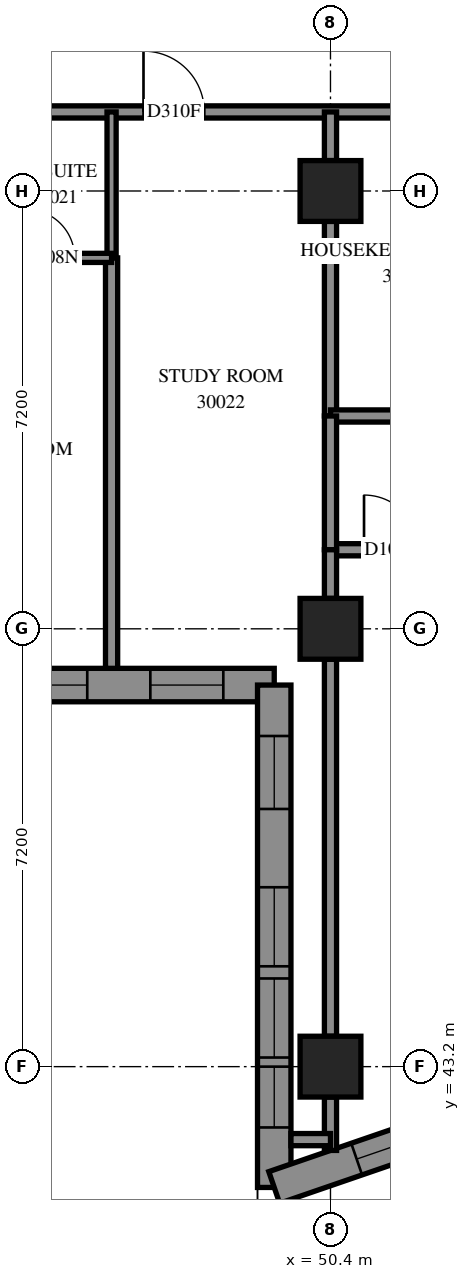
"""IFC4 building model, lengths in metres.
Left out: names, types, materials, properties, quantities, classifications, styles, units other than length and angle.
Written with IfcOpenShell. Run it as: python <this file> out.ifc"""

import sys

from ifc_helpers import new_model, si_unit, direction, frame, frame_2d, origin, origin_2d, place, context, subcontext, project, spatial, polyline, rectangle, outline, extrude, element, fill, save


model = new_model("IFC4")
c1 = context("Model", 3, precision=1e-05, world=origin(), true_north=direction((0.0, 1.0)))
c2 = subcontext(c1, "Body", "Model", "MODEL_VIEW")
j1 = project(units=[si_unit("LENGTHUNIT", "METRE"), si_unit("PLANEANGLEUNIT", "RADIAN")], contexts=[c1])
p1 = place(None, origin())
s1 = spatial("IfcSite", under=j1, at=p1, CompositionType="ELEMENT")
p2 = place(p1, origin())
s2 = spatial("IfcBuilding", under=s1, at=p2, CompositionType="ELEMENT")
p3 = place(p2, frame((0.0, 0.0, 111.8)))
s3 = spatial("IfcBuildingStorey", under=s2, at=p3, CompositionType="ELEMENT", Elevation=111.8)
for number, where, z_axis, x_axis in (
    (1, (50.4, 43.2, 0.0), (0.0, 0.0, 1.0), (1.0, 0.0, 0.0)),
    (2, (50.4, 50.4, 0.0), (0.0, 0.0, 1.0), (1.0, 0.0, 0.0)),
    (3, (50.4, 57.6, 0.0), (0.0, 0.0, 1.0), (1.0, 0.0, 0.0)),
):
    element("IfcColumn", number, at=place(p3, frame(where, z_axis=z_axis, x_axis=x_axis)), inside=s3, PredefinedType="COLUMN", context=c2, shape_type="SweptSolid", body=[
        extrude(rectangle(XDim=1.0, YDim=1.0, at=origin_2d()), origin(), (0.0, 0.0, 1.0), 3.1),
    ])
p4 = place(p3, frame((42.275, 49.475, 0.0), z_axis=(0.0, 0.0, 1.0), x_axis=(1.0, 0.0, 0.0)))
e4 = element("IfcWall", 4, at=p4, inside=s3, PredefinedType="SOLIDWALL", context=c2, shape_type="SweptSolid", body=[
    extrude(outline(polyline([(-0.275, -0.275), (6.925, -0.275), (7.475, 0.275), (0.275, 0.275), (-0.275, -0.275)])), origin(), (0.0, 0.0, 1.0), 3.1),
])
p5 = place(p4, frame((1.325, 0.0, 0.5)))
e5 = element("IfcOpeningElement", 5, at=p5, cuts=e4, PredefinedType="OPENING", context=c2, shape_type="SweptSolid", body=[
    extrude(rectangle(XDim=1.3, YDim=2.45, at=frame_2d((0.65, 1.225))), frame((0.0, 0.285, 0.0), z_axis=(0.0, -1.0, 0.0), x_axis=(1.0, 0.0, 0.0)), (0.0, 0.0, 1.0), 0.57),
])
p6 = place(p4, frame((2.825, 0.0, 0.5)))
e6 = element("IfcOpeningElement", 6, at=p6, cuts=e4, PredefinedType="OPENING", context=c2, shape_type="SweptSolid", body=[
    extrude(rectangle(XDim=1.3, YDim=2.45, at=frame_2d((0.65, 1.225))), frame((0.0, 0.285, 0.0), z_axis=(0.0, -1.0, 0.0), x_axis=(1.0, 0.0, 0.0)), (0.0, 0.0, 1.0), 0.57),
])
p7 = place(p4, frame((5.162, 0.0, 0.5)))
e7 = element("IfcOpeningElement", 7, at=p7, cuts=e4, PredefinedType="OPENING", context=c2, shape_type="SweptSolid", body=[
    extrude(rectangle(XDim=1.2, YDim=2.45, at=frame_2d((0.6, 1.225))), frame((0.0, 0.285, 0.0), z_axis=(0.0, -1.0, 0.0), x_axis=(1.0, 0.0, 0.0)), (0.0, 0.0, 1.0), 0.57),
])
p8 = place(p3, frame((49.475, 49.475, 0.0), z_axis=(0.0, 0.0, 1.0), x_axis=(0.0, -1.0, 0.0)))
e8 = element("IfcWall", 8, at=p8, inside=s3, PredefinedType="SOLIDWALL", context=c2, shape_type="SweptSolid", body=[
    extrude(outline(polyline([(0.275, -0.275), (8.647, -0.275), (7.876, 0.275), (-0.275, 0.275), (0.275, -0.275)])), origin(), (0.0, 0.0, 1.0), 3.1),
])
p9 = place(p8, frame((3.325, 0.0, 0.5)))
e9 = element("IfcOpeningElement", 9, at=p9, cuts=e8, PredefinedType="OPENING", context=c2, shape_type="SweptSolid", body=[
    extrude(rectangle(XDim=1.3, YDim=2.45, at=frame_2d((0.65, 1.225))), frame((0.0, 0.285, 0.0), z_axis=(0.0, -1.0, 0.0), x_axis=(1.0, 0.0, 0.0)), (0.0, 0.0, 1.0), 0.57),
])
p10 = place(p8, frame((4.825, 0.0, 0.5)))
e10 = element("IfcOpeningElement", 10, at=p10, cuts=e8, PredefinedType="OPENING", context=c2, shape_type="SweptSolid", body=[
    extrude(rectangle(XDim=1.3, YDim=2.45, at=frame_2d((0.65, 1.225))), frame((0.0, 0.285, 0.0), z_axis=(0.0, -1.0, 0.0), x_axis=(1.0, 0.0, 0.0)), (0.0, 0.0, 1.0), 0.57),
])
p11 = place(p8, frame((0.838, 0.0, 0.5)))
e11 = element("IfcOpeningElement", 11, at=p11, cuts=e8, PredefinedType="OPENING", context=c2, shape_type="SweptSolid", body=[
    extrude(rectangle(XDim=1.2, YDim=2.45, at=frame_2d((0.6, 1.225))), frame((0.0, 0.285, 0.0), z_axis=(0.0, -1.0, 0.0), x_axis=(1.0, 0.0, 0.0)), (0.0, 0.0, 1.0), 0.57),
])
p12 = place(p8, frame((6.275, 0.0, 0.45)))
e12 = element("IfcOpeningElement", 12, at=p12, cuts=e8, PredefinedType="OPENING", context=c2, shape_type="SweptSolid", body=[
    extrude(rectangle(XDim=1.0, YDim=2.5, at=frame_2d((0.5, 1.25))), frame((0.0, 0.285, 0.0), z_axis=(0.0, -1.0, 0.0), x_axis=(1.0, 0.0, 0.0)), (0.0, 0.0, 1.0), 0.57),
])
p13 = place(p3, frame((49.475, 41.213, 0.0), z_axis=(0.0, 0.0, 1.0), x_axis=(0.9456585559, 0.3251613379, 0.0)))
e13 = element("IfcWall", 13, at=p13, inside=s3, PredefinedType="SOLIDWALL", context=c2, shape_type="SweptSolid", body=[
    extrude(outline(polyline([(-0.385, -0.275), (3.219, -0.275), (3.359, 0.275), (0.385, 0.275), (-0.385, -0.275)])), origin(), (0.0, 0.0, 1.0), 3.1),
])
p14 = place(p13, frame((1.434, 0.0, 0.5)))
e14 = element("IfcOpeningElement", 14, at=p14, cuts=e13, PredefinedType="OPENING", context=c2, shape_type="SweptSolid", body=[
    extrude(rectangle(XDim=1.2, YDim=2.45, at=frame_2d((0.6, 1.225))), frame((0.0, 0.285, 0.0), z_axis=(0.0, -1.0, 0.0), x_axis=(1.0, 0.0, 0.0)), (0.0, 0.0, 1.0), 0.57),
])
p15 = place(p3, frame((28.802, 58.9, 0.0), z_axis=(0.0, 0.0, 1.0), x_axis=(1.0, 0.0, 0.0)))
e15 = element("IfcWall", 15, at=p15, inside=s3, PredefinedType="PARTITIONING", context=c2, shape_type="SweptSolid", body=[
    extrude(rectangle(XDim=24.098, YDim=0.2, at=frame_2d((12.049, 0.0))), origin(), (0.0, 0.0, 1.0), 3.1),
])
p16 = place(p15, frame((11.323, 0.0, 0.0)))
e16 = element("IfcOpeningElement", 16, at=p16, cuts=e15, PredefinedType="OPENING", context=c2, shape_type="SweptSolid", body=[
    extrude(rectangle(XDim=1.0, YDim=2.1, at=frame_2d((0.5, 1.05))), frame((0.0, 0.11, 0.0), z_axis=(0.0, -1.0, 0.0), x_axis=(1.0, 0.0, 0.0)), (0.0, 0.0, 1.0), 0.22),
])
p17 = place(p15, frame((14.908, 0.0, 0.0)))
e17 = element("IfcOpeningElement", 17, at=p17, cuts=e15, PredefinedType="OPENING", context=c2, shape_type="SweptSolid", body=[
    extrude(rectangle(XDim=0.9, YDim=2.1, at=frame_2d((0.45, 1.05))), frame((0.0, 0.11, 0.0), z_axis=(0.0, -1.0, 0.0), x_axis=(1.0, 0.0, 0.0)), (0.0, 0.0, 1.0), 0.22),
])
p18 = place(p15, frame((18.523, 0.0, 0.0)))
e18 = element("IfcOpeningElement", 18, at=p18, cuts=e15, PredefinedType="OPENING", context=c2, shape_type="SweptSolid", body=[
    extrude(rectangle(XDim=1.0, YDim=2.1, at=frame_2d((0.5, 1.05))), frame((0.0, 0.11, 0.0), z_axis=(0.0, -1.0, 0.0), x_axis=(1.0, 0.0, 0.0)), (0.0, 0.0, 1.0), 0.22),
])
p19 = place(p15, frame((22.845, 0.0, 0.0)))
e19 = element("IfcOpeningElement", 19, at=p19, cuts=e15, PredefinedType="OPENING", context=c2, shape_type="SweptSolid", body=[
    extrude(rectangle(XDim=1.0, YDim=2.1, at=frame_2d((0.5, 1.05))), frame((0.0, 0.11, 0.0), z_axis=(0.0, -1.0, 0.0), x_axis=(1.0, 0.0, 0.0)), (0.0, 0.0, 1.0), 0.22),
])
p20 = place(p3, frame((46.8, 49.75, 0.0), z_axis=(0.0, 0.0, 1.0), x_axis=(0.0, 1.0, 0.0)))
e20 = element("IfcWall", 20, at=p20, inside=s3, PredefinedType="PARTITIONING", context=c2, shape_type="SweptSolid", body=[
    extrude(rectangle(XDim=6.75, YDim=0.2, at=frame_2d((3.375, 0.0))), origin(), (0.0, 0.0, 1.0), 3.1),
])
p21 = place(p3, frame((50.4, 43.7, 0.0), z_axis=(0.0, 0.0, 1.0), x_axis=(0.0, 1.0, 0.0)))
e21 = element("IfcWall", 21, at=p21, inside=s3, PredefinedType="PARTITIONING", context=c2, shape_type="SweptSolid", body=[
    extrude(rectangle(XDim=6.2, YDim=0.2, at=frame_2d((3.1, 0.0))), origin(), (0.0, 0.0, 1.0), 2.6),
])
p22 = place(p3, frame((50.4, 51.7, 0.0), z_axis=(0.0, 0.0, 1.0), x_axis=(1.0, 0.0, 0.0)))
e22 = element("IfcWall", 22, at=p22, inside=s3, PredefinedType="PARTITIONING", context=c2, shape_type="SweptSolid", body=[
    extrude(rectangle(XDim=4.3, YDim=0.2, at=frame_2d((2.15, 0.0))), origin(), (0.0, 0.0, 1.0), 3.1),
])
p23 = place(p22, frame((0.552, 0.0, 0.0)))
e23 = element("IfcOpeningElement", 23, at=p23, cuts=e22, PredefinedType="OPENING", context=c2, shape_type="SweptSolid", body=[
    extrude(rectangle(XDim=0.9, YDim=2.1, at=frame_2d((0.45, 1.05))), frame((0.0, 0.11, 0.0), z_axis=(0.0, -1.0, 0.0), x_axis=(1.0, 0.0, 0.0)), (0.0, 0.0, 1.0), 0.22),
])
p24 = place(p3, frame((50.4, 53.9, 0.0), z_axis=(0.0, 0.0, 1.0), x_axis=(0.0, 1.0, 0.0)))
e24 = element("IfcWall", 24, at=p24, inside=s3, PredefinedType="PARTITIONING", context=c2, shape_type="SweptSolid", body=[
    extrude(rectangle(XDim=3.2, YDim=0.2, at=frame_2d((1.6, 0.0))), origin(), (0.0, 0.0, 1.0), 3.1),
])
p25 = place(p3, frame((50.4, 53.9, 0.0), z_axis=(0.0, 0.0, 1.0), x_axis=(1.0, 0.0, 0.0)))
e25 = element("IfcWall", 25, at=p25, inside=s3, PredefinedType="PARTITIONING", context=c2, shape_type="SweptSolid", body=[
    extrude(rectangle(XDim=2.5, YDim=0.2, at=frame_2d((1.25, 0.0))), origin(), (0.0, 0.0, 1.0), 3.1),
])
p26 = place(p3, frame((46.8, 56.5, 0.0), z_axis=(0.0, 0.0, 1.0), x_axis=(0.0, 1.0, 0.0)))
e26 = element("IfcWall", 26, at=p26, inside=s3, PredefinedType="PARTITIONING", context=c2, shape_type="SweptSolid", body=[
    extrude(rectangle(XDim=2.4, YDim=0.15, at=frame_2d((1.2, 0.0))), origin(), (0.0, 0.0, 1.0), 3.1),
])
p27 = place(p3, frame((50.4, 51.7, 0.0), z_axis=(0.0, 0.0, 1.0), x_axis=(0.0, 1.0, 0.0)))
e27 = element("IfcWall", 27, at=p27, inside=s3, PredefinedType="PARTITIONING", context=c2, shape_type="SweptSolid", body=[
    extrude(rectangle(XDim=2.2, YDim=0.2, at=frame_2d((1.1, 0.0))), origin(), (0.0, 0.0, 1.0), 3.1),
])
p28 = place(p3, frame((44.9, 56.5, 0.0), z_axis=(0.0, 0.0, 1.0), x_axis=(1.0, 0.0, 0.0)))
e28 = element("IfcWall", 28, at=p28, inside=s3, PredefinedType="PARTITIONING", context=c2, shape_type="SweptSolid", body=[
    extrude(rectangle(XDim=1.9, YDim=0.15, at=frame_2d((0.95, 0.0))), origin(), (0.0, 0.0, 1.0), 3.1),
])
p29 = place(p28, frame((0.493, 0.0, 0.0)))
e29 = element("IfcOpeningElement", 29, at=p29, cuts=e28, PredefinedType="OPENING", context=c2, shape_type="SweptSolid", body=[
    extrude(rectangle(XDim=0.8, YDim=2.1, at=frame_2d((0.4, 1.05))), frame((0.0, 0.085, 0.0), z_axis=(0.0, -1.0, 0.0), x_axis=(1.0, 0.0, 0.0)), (0.0, 0.0, 1.0), 0.17),
])
for number, where, z_axis, x_axis in (
    (30, (50.4, 50.9, 0.0), (0.0, 0.0, 1.0), (0.0, 1.0, 0.0)),
    (31, (50.4, 58.1, 0.0), (0.0, 0.0, 1.0), (0.0, 1.0, 0.0)),
):
    element("IfcWall", number, at=place(p3, frame(where, z_axis=z_axis, x_axis=x_axis)), inside=s3, PredefinedType="PARTITIONING", context=c2, shape_type="SweptSolid", body=[
        extrude(rectangle(XDim=0.8, YDim=0.2, at=frame_2d((0.4, 0.0))), origin(), (0.0, 0.0, 1.0), 3.1),
    ])
p30 = place(p3, frame((50.4, 41.822, 0.0), z_axis=(0.0, 0.0, 1.0), x_axis=(0.0, 1.0, 0.0)))
e32 = element("IfcWall", 32, at=p30, inside=s3, PredefinedType="PARTITIONING", context=c2, shape_type="SweptSolid", body=[
    extrude(rectangle(XDim=0.878, YDim=0.2, at=frame_2d((0.439, 0.0))), origin(), (0.0, 0.0, 1.0), 3.1),
])
p31 = place(p3, frame((49.75, 42.0, 0.0), z_axis=(0.0, 0.0, 1.0), x_axis=(1.0, 0.0, 0.0)))
e33 = element("IfcWall", 33, at=p31, inside=s3, PredefinedType="PARTITIONING", context=c2, shape_type="SweptSolid", body=[
    extrude(rectangle(XDim=0.65, YDim=0.2, at=frame_2d((0.325, 0.0))), origin(), (0.0, 0.0, 1.0), 3.1),
])
p32 = place(p6, origin())
e34 = element("IfcWindow", 34, at=p32, inside=s3, PartitioningType="SINGLE_PANEL", PredefinedType="WINDOW", context=c2, shape_type="SweptSolid", body=[
    extrude(rectangle(XDim=1.3, YDim=2.45, at=frame_2d((0.65, 1.225))), frame((0.0, 0.155, 0.0), z_axis=(0.0, -1.0, 0.0), x_axis=(1.0, 0.0, 0.0)), (0.0, 0.0, 1.0), 0.06),
])
fill(e6, e34)
p33 = place(p7, origin())
e35 = element("IfcWindow", 35, at=p33, inside=s3, PartitioningType="SINGLE_PANEL", PredefinedType="WINDOW", context=c2, shape_type="SweptSolid", body=[
    extrude(rectangle(XDim=1.2, YDim=2.45, at=frame_2d((0.6, 1.225))), frame((0.0, 0.155, 0.0), z_axis=(0.0, -1.0, 0.0), x_axis=(1.0, 0.0, 0.0)), (0.0, 0.0, 1.0), 0.06),
])
fill(e7, e35)
p34 = place(p9, origin())
e36 = element("IfcWindow", 36, at=p34, inside=s3, PartitioningType="SINGLE_PANEL", PredefinedType="WINDOW", context=c2, shape_type="SweptSolid", body=[
    extrude(rectangle(XDim=1.3, YDim=2.45, at=frame_2d((0.65, 1.225))), frame((0.0, 0.155, 0.0), z_axis=(0.0, -1.0, 0.0), x_axis=(1.0, 0.0, 0.0)), (0.0, 0.0, 1.0), 0.06),
])
fill(e9, e36)
p35 = place(p10, origin())
e37 = element("IfcWindow", 37, at=p35, inside=s3, PartitioningType="SINGLE_PANEL", PredefinedType="WINDOW", context=c2, shape_type="SweptSolid", body=[
    extrude(rectangle(XDim=1.3, YDim=2.45, at=frame_2d((0.65, 1.225))), frame((0.0, 0.155, 0.0), z_axis=(0.0, -1.0, 0.0), x_axis=(1.0, 0.0, 0.0)), (0.0, 0.0, 1.0), 0.06),
])
fill(e10, e37)
p36 = place(p11, origin())
e38 = element("IfcWindow", 38, at=p36, inside=s3, PartitioningType="SINGLE_PANEL", PredefinedType="WINDOW", context=c2, shape_type="SweptSolid", body=[
    extrude(rectangle(XDim=1.2, YDim=2.45, at=frame_2d((0.6, 1.225))), frame((0.0, 0.155, 0.0), z_axis=(0.0, -1.0, 0.0), x_axis=(1.0, 0.0, 0.0)), (0.0, 0.0, 1.0), 0.06),
])
fill(e11, e38)
p37 = place(p14, origin())
e39 = element("IfcWindow", 39, at=p37, inside=s3, PartitioningType="SINGLE_PANEL", PredefinedType="WINDOW", context=c2, shape_type="SweptSolid", body=[
    extrude(rectangle(XDim=1.2, YDim=2.45, at=frame_2d((0.6, 1.225))), frame((0.0, 0.155, 0.0), z_axis=(0.0, -1.0, 0.0), x_axis=(1.0, 0.0, 0.0)), (0.0, 0.0, 1.0), 0.06),
])
fill(e14, e39)
p38 = place(p29, origin())
e40 = element("IfcDoor", 40, at=p38, inside=s3, OperationType="SINGLE_SWING_RIGHT", PredefinedType="DOOR", context=c2, shape_type="SweptSolid", body=[
    extrude(rectangle(XDim=0.8, YDim=2.1, at=frame_2d((0.4, 1.05))), frame((0.0, 0.025, 0.0), z_axis=(0.0, -1.0, 0.0), x_axis=(1.0, 0.0, 0.0)), (0.0, 0.0, 1.0), 0.05),
])
fill(e29, e40)
p39 = place(p18, origin())
e41 = element("IfcDoor", 41, at=p39, inside=s3, OperationType="SINGLE_SWING_RIGHT", PredefinedType="DOOR", context=c2, shape_type="SweptSolid", body=[
    extrude(rectangle(XDim=1.0, YDim=2.1, at=frame_2d((0.5, 1.05))), frame((0.0, 0.025, 0.0), z_axis=(0.0, -1.0, 0.0), x_axis=(1.0, 0.0, 0.0)), (0.0, 0.0, 1.0), 0.05),
])
fill(e18, e41)
p40 = place(p23, origin())
e42 = element("IfcDoor", 42, at=p40, inside=s3, OperationType="SINGLE_SWING_LEFT", PredefinedType="DOOR", context=c2, shape_type="SweptSolid", body=[
    extrude(rectangle(XDim=0.9, YDim=2.1, at=frame_2d((0.45, 1.05))), frame((0.0, 0.025, 0.0), z_axis=(0.0, -1.0, 0.0), x_axis=(1.0, 0.0, 0.0)), (0.0, 0.0, 1.0), 0.05),
])
fill(e23, e42)
p41 = place(p12, origin())
e43 = element("IfcWindow", 43, at=p41, inside=s3, PartitioningType="SINGLE_PANEL", PredefinedType="WINDOW", context=c2, shape_type="SweptSolid", body=[
    extrude(rectangle(XDim=1.0, YDim=2.5, at=frame_2d((0.5, 1.25))), frame((0.0, 0.155, 0.0), z_axis=(0.0, -1.0, 0.0), x_axis=(1.0, 0.0, 0.0)), (0.0, 0.0, 1.0), 0.06),
])
fill(e12, e43)
save(model, sys.argv[1])
